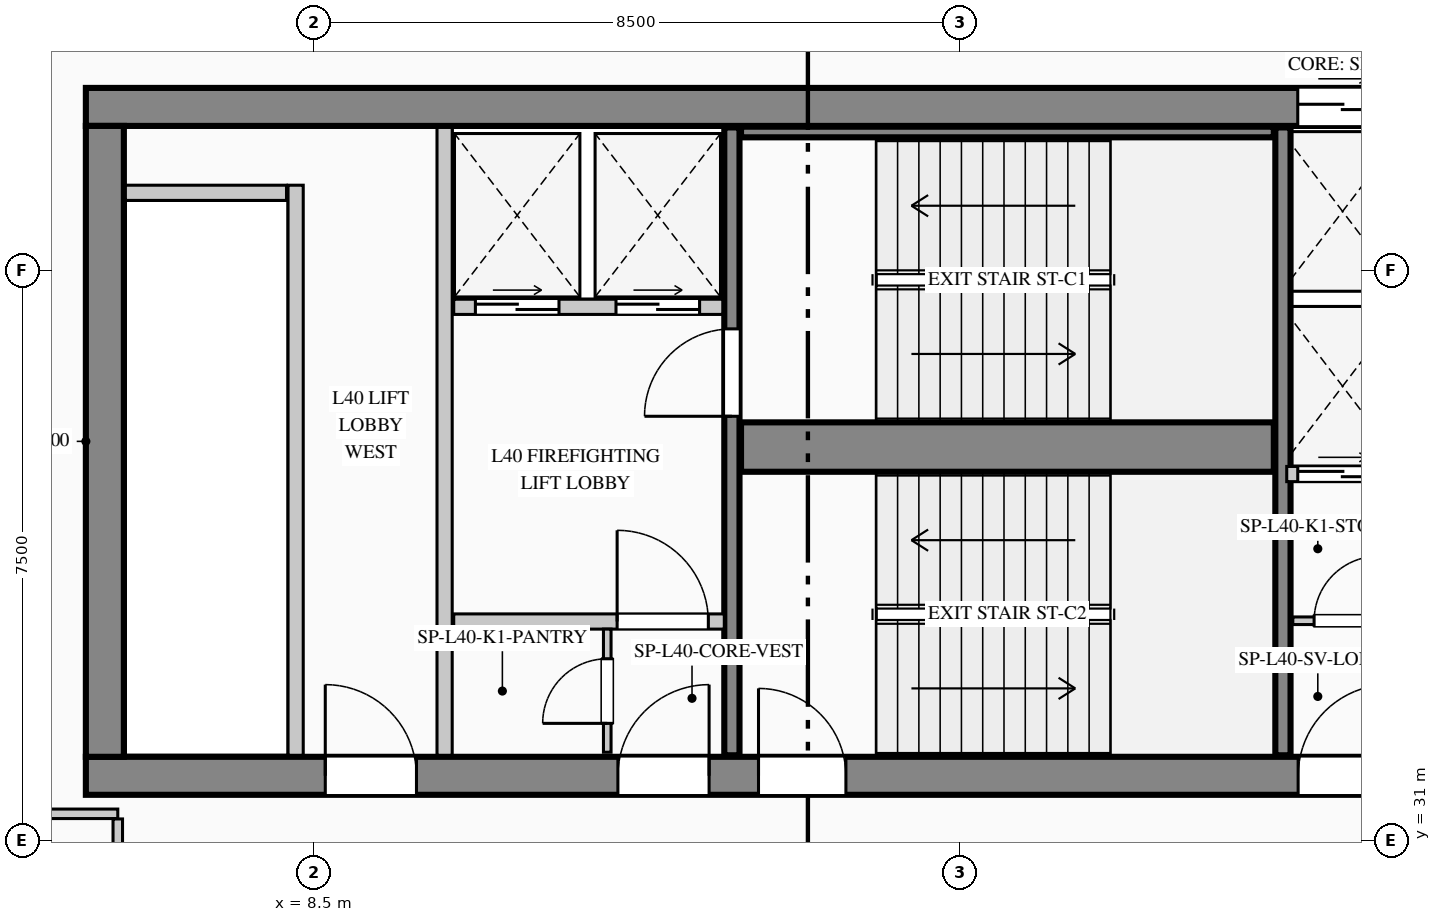
"""IFC4 building model, lengths in metres.
Left out: names, types, materials, properties, quantities, classifications, styles, units other than length and angle.
Written with IfcOpenShell. Run it as: python <this file> out.ifc"""

import sys

from ifc_helpers import new_model, si_unit, direction, frame, frame_2d, origin, place, context, subcontext, project, spatial, rectangle, extrude, element, fill, save


model = new_model("IFC4")
c1 = context("Model", 3, precision=1e-05, world=origin(), true_north=direction((0.0, 1.0)))
c2 = subcontext(c1, "Body", "Model", "MODEL_VIEW")
j1 = project(units=[si_unit("LENGTHUNIT", "METRE"), si_unit("PLANEANGLEUNIT", "RADIAN")], contexts=[c1])
p1 = place(None, origin())
s1 = spatial("IfcSite", under=j1, at=p1, CompositionType="ELEMENT")
p2 = place(p1, origin())
s2 = spatial("IfcBuilding", under=s1, at=p2, CompositionType="ELEMENT")
p3 = place(p2, frame((0.0, 0.0, 170.65)))
s3 = spatial("IfcBuildingStorey", under=s2, at=p3, CompositionType="ELEMENT", Elevation=170.65)
p4 = place(p3, frame((5.5, 40.65, 0.0), z_axis=(0.0, 0.0, 1.0), x_axis=(1.0, 0.0, 0.0)))
e1 = element("IfcWall", 1, at=p4, inside=s3, PredefinedType="SHEAR", context=c2, shape_type="SweptSolid", body=[
    extrude(rectangle(XDim=17.85, YDim=0.5, at=frame_2d((8.925, 0.0))), origin(), (0.0, 0.0, 1.0), 3.95),
])
p5 = place(p4, frame((15.945, 0.0, 0.0)))
e2 = element("IfcOpeningElement", 2, at=p5, cuts=e1, PredefinedType="OPENING", context=c2, shape_type="SweptSolid", body=[
    extrude(rectangle(XDim=1.18, YDim=2.25, at=frame_2d((0.59, 1.125))), frame((0.0, 0.26, 0.0), z_axis=(0.0, -1.0, 0.0), x_axis=(1.0, 0.0, 0.0)), (0.0, 0.0, 1.0), 0.52),
])
p6 = place(p3, frame((5.5, 31.85, 0.0), z_axis=(0.0, 0.0, 1.0), x_axis=(1.0, 0.0, 0.0)))
e3 = element("IfcWall", 3, at=p6, inside=s3, PredefinedType="SHEAR", context=c2, shape_type="SweptSolid", body=[
    extrude(rectangle(XDim=17.85, YDim=0.5, at=frame_2d((8.925, 0.0))), origin(), (0.0, 0.0, 1.0), 3.95),
])
p7 = place(p6, frame((3.15, 0.0, 0.0)))
e4 = element("IfcOpeningElement", 4, at=p7, cuts=e3, PredefinedType="OPENING", context=c2, shape_type="SweptSolid", body=[
    extrude(rectangle(XDim=1.2, YDim=2.2, at=frame_2d((0.6, 1.1))), frame((0.0, 0.26, 0.0), z_axis=(0.0, -1.0, 0.0), x_axis=(1.0, 0.0, 0.0)), (0.0, 0.0, 1.0), 0.52),
])
p8 = place(p6, frame((7.0, 0.0, 0.0)))
e5 = element("IfcOpeningElement", 5, at=p8, cuts=e3, PredefinedType="OPENING", context=c2, shape_type="SweptSolid", body=[
    extrude(rectangle(XDim=1.2, YDim=2.2, at=frame_2d((0.6, 1.1))), frame((0.0, 0.26, 0.0), z_axis=(0.0, -1.0, 0.0), x_axis=(1.0, 0.0, 0.0)), (0.0, 0.0, 1.0), 0.52),
])
p9 = place(p6, frame((8.85, 0.0, 0.0)))
e6 = element("IfcOpeningElement", 6, at=p9, cuts=e3, PredefinedType="OPENING", context=c2, shape_type="SweptSolid", body=[
    extrude(rectangle(XDim=1.15, YDim=2.2, at=frame_2d((0.575, 1.1))), frame((0.0, 0.26, 0.0), z_axis=(0.0, -1.0, 0.0), x_axis=(1.0, 0.0, 0.0)), (0.0, 0.0, 1.0), 0.52),
])
p10 = place(p6, frame((15.95, 0.0, 0.0)))
e7 = element("IfcOpeningElement", 7, at=p10, cuts=e3, PredefinedType="OPENING", context=c2, shape_type="SweptSolid", body=[
    extrude(rectangle(XDim=1.2, YDim=2.2, at=frame_2d((0.6, 1.1))), frame((0.0, 0.26, 0.0), z_axis=(0.0, -1.0, 0.0), x_axis=(1.0, 0.0, 0.0)), (0.0, 0.0, 1.0), 0.52),
])
p11 = place(p3, frame((5.75, 32.1, 0.0), z_axis=(0.0, 0.0, 1.0), x_axis=(0.0, 1.0, 0.0)))
e8 = element("IfcWall", 8, at=p11, inside=s3, PredefinedType="SHEAR", context=c2, shape_type="SweptSolid", body=[
    extrude(rectangle(XDim=8.3, YDim=0.5, at=frame_2d((4.15, 0.0))), origin(), (0.0, 0.0, 1.0), 3.95),
])
p12 = place(p3, frame((14.0, 32.12, 0.0), z_axis=(0.0, 0.0, 1.0), x_axis=(0.0, 1.0, 0.0)))
e9 = element("IfcWall", 9, at=p12, inside=s3, PredefinedType="SHEAR", context=c2, shape_type="SweptSolid", body=[
    extrude(rectangle(XDim=8.26, YDim=0.2, at=frame_2d((4.13, 0.0))), origin(), (0.0, 0.0, 1.0), 3.95),
])
p13 = place(p12, frame((4.46, 0.0, 0.0)))
e10 = element("IfcOpeningElement", 10, at=p13, cuts=e9, PredefinedType="OPENING", context=c2, shape_type="SweptSolid", body=[
    extrude(rectangle(XDim=1.15, YDim=2.2, at=frame_2d((0.575, 1.1))), frame((0.0, 0.11, 0.0), z_axis=(0.0, -1.0, 0.0), x_axis=(1.0, 0.0, 0.0)), (0.0, 0.0, 1.0), 0.22),
])
p14 = place(p3, frame((14.12, 36.175, 0.0), z_axis=(0.0, 0.0, 1.0), x_axis=(1.0, 0.0, 0.0)))
e11 = element("IfcWall", 11, at=p14, inside=s3, PredefinedType="SHEAR", context=c2, shape_type="SweptSolid", body=[
    extrude(rectangle(XDim=7.01, YDim=0.65, at=frame_2d((3.505, 0.0))), origin(), (0.0, 0.0, 1.0), 3.95),
])
p15 = place(p3, frame((21.25, 32.12, 0.0), z_axis=(0.0, 0.0, 1.0), x_axis=(0.0, 1.0, 0.0)))
e12 = element("IfcWall", 12, at=p15, inside=s3, PredefinedType="SHEAR", context=c2, shape_type="SweptSolid", body=[
    extrude(rectangle(XDim=8.26, YDim=0.2, at=frame_2d((4.13, 0.0))), origin(), (0.0, 0.0, 1.0), 3.95),
])
p16 = place(p3, frame((14.12, 40.32, 0.0), z_axis=(0.0, 0.0, 1.0), x_axis=(1.0, 0.0, 0.0)))
e13 = element("IfcWall", 13, at=p16, inside=s3, PredefinedType="SHEAR", context=c2, shape_type="SweptSolid", body=[
    extrude(rectangle(XDim=7.01, YDim=0.14, at=frame_2d((3.505, 0.0))), origin(), (0.0, 0.0, 1.0), 3.95),
])
p17 = place(p3, frame((7.993, 4.73, 0.0), z_axis=(0.0, 0.0, 1.0), x_axis=(-0.136989009016, 0.990572567462, 0.0)))
e14 = element("IfcWall", 14, at=p17, inside=s3, PredefinedType="STANDARD", context=c2, shape_type="SweptSolid", body=[
    extrude(rectangle(XDim=36.888, YDim=0.26, at=frame_2d((18.444, 0.0))), origin(), (0.0, 0.0, 1.0), 3.69),
])
p18 = place(p17, frame((20.949, 0.0, 0.9)))
e15 = element("IfcOpeningElement", 15, at=p18, cuts=e14, PredefinedType="OPENING", context=c2, shape_type="SweptSolid", body=[
    extrude(rectangle(XDim=2.1, YDim=2.0, at=frame_2d((1.05, 1.0))), frame((0.0, 0.14, 0.0), z_axis=(0.0, -1.0, 0.0), x_axis=(1.0, 0.0, 0.0)), (0.0, 0.0, 1.0), 0.28),
])
p19 = place(p3, frame((8.26, 32.12, 0.0), z_axis=(0.0, 0.0, 1.0), x_axis=(0.0, 1.0, 0.0)))
e16 = element("IfcWall", 16, at=p19, inside=s3, PredefinedType="PARTITIONING", context=c2, shape_type="SweptSolid", body=[
    extrude(rectangle(XDim=7.5, YDim=0.2, at=frame_2d((3.75, 0.0))), origin(), (0.0, 0.0, 1.0), 3.69),
])
p20 = place(p3, frame((6.02, 39.52, 0.0), z_axis=(0.0, 0.0, 1.0), x_axis=(1.0, 0.0, 0.0)))
e17 = element("IfcWall", 17, at=p20, inside=s3, PredefinedType="PARTITIONING", context=c2, shape_type="SweptSolid", body=[
    extrude(rectangle(XDim=2.12, YDim=0.2, at=frame_2d((1.06, 0.0))), origin(), (0.0, 0.0, 1.0), 3.69),
])
p21 = place(p3, frame((10.22, 32.12, 0.0), z_axis=(0.0, 0.0, 1.0), x_axis=(0.0, 1.0, 0.0)))
e18 = element("IfcWall", 18, at=p21, inside=s3, PredefinedType="PARTITIONING", context=c2, shape_type="SweptSolid", body=[
    extrude(rectangle(XDim=8.26, YDim=0.2, at=frame_2d((4.13, 0.0))), origin(), (0.0, 0.0, 1.0), 3.69),
])
p22 = place(p3, frame((10.34, 38.02, 0.0), z_axis=(0.0, 0.0, 1.0), x_axis=(1.0, 0.0, 0.0)))
e19 = element("IfcWall", 19, at=p22, inside=s3, PredefinedType="PARTITIONING", context=c2, shape_type="SweptSolid", body=[
    extrude(rectangle(XDim=3.54, YDim=0.2, at=frame_2d((1.77, 0.0))), origin(), (0.0, 0.0, 1.0), 3.69),
])
p23 = place(p22, frame((0.285, 0.0, 0.0)))
e20 = element("IfcOpeningElement", 20, at=p23, cuts=e19, PredefinedType="OPENING", context=c2, shape_type="SweptSolid", body=[
    extrude(rectangle(XDim=1.1, YDim=2.2, at=frame_2d((0.55, 1.1))), frame((0.0, 0.11, 0.0), z_axis=(0.0, -1.0, 0.0), x_axis=(1.0, 0.0, 0.0)), (0.0, 0.0, 1.0), 0.22),
])
p24 = place(p22, frame((2.135, 0.0, 0.0)))
e21 = element("IfcOpeningElement", 21, at=p24, cuts=e19, PredefinedType="OPENING", context=c2, shape_type="SweptSolid", body=[
    extrude(rectangle(XDim=1.1, YDim=2.2, at=frame_2d((0.55, 1.1))), frame((0.0, 0.11, 0.0), z_axis=(0.0, -1.0, 0.0), x_axis=(1.0, 0.0, 0.0)), (0.0, 0.0, 1.0), 0.22),
])
p25 = place(p3, frame((10.34, 33.88, 0.0), z_axis=(0.0, 0.0, 1.0), x_axis=(1.0, 0.0, 0.0)))
e22 = element("IfcWall", 22, at=p25, inside=s3, PredefinedType="PARTITIONING", context=c2, shape_type="SweptSolid", body=[
    extrude(rectangle(XDim=3.56, YDim=0.2, at=frame_2d((1.78, 0.0))), origin(), (0.0, 0.0, 1.0), 3.69),
])
p26 = place(p25, frame((2.15, 0.0, 0.0)))
e23 = element("IfcOpeningElement", 23, at=p26, cuts=e22, PredefinedType="OPENING", context=c2, shape_type="SweptSolid", body=[
    extrude(rectangle(XDim=1.2, YDim=2.2, at=frame_2d((0.6, 1.1))), frame((0.0, 0.11, 0.0), z_axis=(0.0, -1.0, 0.0), x_axis=(1.0, 0.0, 0.0)), (0.0, 0.0, 1.0), 0.22),
])
p27 = place(p3, frame((12.36, 32.16, 0.0), z_axis=(0.0, 0.0, 1.0), x_axis=(0.0, 1.0, 0.0)))
e24 = element("IfcWall", 24, at=p27, inside=s3, PredefinedType="PARTITIONING", context=c2, shape_type="SweptSolid", body=[
    extrude(rectangle(XDim=1.62, YDim=0.1, at=frame_2d((0.81, 0.0))), origin(), (0.0, 0.0, 1.0), 3.69),
])
p28 = place(p27, frame((0.38, 0.0, 0.0)))
e25 = element("IfcOpeningElement", 25, at=p28, cuts=e24, PredefinedType="OPENING", context=c2, shape_type="SweptSolid", body=[
    extrude(rectangle(XDim=0.85, YDim=2.1, at=frame_2d((0.425, 1.05))), frame((0.0, 0.06, 0.0), z_axis=(0.0, -1.0, 0.0), x_axis=(1.0, 0.0, 0.0)), (0.0, 0.0, 1.0), 0.12),
])
p29 = place(p3, frame((21.38, 33.89, 0.0), z_axis=(0.0, 0.0, 1.0), x_axis=(1.0, 0.0, 0.0)))
e26 = element("IfcWall", 26, at=p29, inside=s3, PredefinedType="PARTITIONING", context=c2, shape_type="SweptSolid", body=[
    extrude(rectangle(XDim=1.42, YDim=0.1, at=frame_2d((0.71, 0.0))), origin(), (0.0, 0.0, 1.0), 3.69),
])
p30 = place(p29, frame((0.28, 0.0, 0.0)))
e27 = element("IfcOpeningElement", 27, at=p30, cuts=e26, PredefinedType="OPENING", context=c2, shape_type="SweptSolid", body=[
    extrude(rectangle(XDim=0.85, YDim=2.1, at=frame_2d((0.425, 1.05))), frame((0.0, 0.06, 0.0), z_axis=(0.0, -1.0, 0.0), x_axis=(1.0, 0.0, 0.0)), (0.0, 0.0, 1.0), 0.12),
])
p31 = place(p3, frame((21.3, 35.82, 0.0), z_axis=(0.0, 0.0, 1.0), x_axis=(1.0, 0.0, 0.0)))
e28 = element("IfcWall", 28, at=p31, inside=s3, PredefinedType="PARTITIONING", context=c2, shape_type="SweptSolid", body=[
    extrude(rectangle(XDim=1.5, YDim=0.2, at=frame_2d((0.75, 0.0))), origin(), (0.0, 0.0, 1.0), 3.69),
])
p32 = place(p31, frame((0.145, 0.0, 0.0)))
e29 = element("IfcOpeningElement", 29, at=p32, cuts=e28, PredefinedType="OPENING", context=c2, shape_type="SweptSolid", body=[
    extrude(rectangle(XDim=1.18, YDim=2.25, at=frame_2d((0.59, 1.125))), frame((0.0, 0.11, 0.0), z_axis=(0.0, -1.0, 0.0), x_axis=(1.0, 0.0, 0.0)), (0.0, 0.0, 1.0), 0.22),
])
p33 = place(p3, frame((4.448, 31.35, 0.0), z_axis=(0.0, 0.0, 1.0), x_axis=(1.0, 0.0, 0.0)))
e30 = element("IfcWall", 30, at=p33, inside=s3, PredefinedType="PARTITIONING", context=c2, shape_type="SweptSolid", body=[
    extrude(rectangle(XDim=1.472, YDim=0.125, at=frame_2d((0.736, 0.0))), origin(), (0.0, 0.0, 1.0), 3.69),
])
p34 = place(p3, frame((5.92, 31.282, 0.0), z_axis=(0.0, 0.0, 1.0), x_axis=(0.0, -1.0, 0.0)))
e31 = element("IfcWall", 31, at=p34, inside=s3, PredefinedType="PARTITIONING", context=c2, shape_type="SweptSolid", body=[
    extrude(rectangle(XDim=2.682, YDim=0.125, at=frame_2d((1.341, 0.0))), origin(), (0.0, 0.0, 1.0), 3.69),
])
p35 = place(p7, origin())
e32 = element("IfcDoor", 32, at=p35, inside=s3, OperationType="SINGLE_SWING_LEFT", PredefinedType="DOOR", context=c2, shape_type="SweptSolid", body=[
    extrude(rectangle(XDim=1.2, YDim=2.2, at=frame_2d((0.6, 1.1))), frame((0.0, 0.025, 0.0), z_axis=(0.0, -1.0, 0.0), x_axis=(1.0, 0.0, 0.0)), (0.0, 0.0, 1.0), 0.05),
])
fill(e4, e32)
p36 = place(p8, origin())
e33 = element("IfcDoor", 33, at=p36, inside=s3, OperationType="SINGLE_SWING_RIGHT", PredefinedType="DOOR", context=c2, shape_type="SweptSolid", body=[
    extrude(rectangle(XDim=1.2, YDim=2.2, at=frame_2d((0.6, 1.1))), frame((0.0, 0.025, 0.0), z_axis=(0.0, -1.0, 0.0), x_axis=(1.0, 0.0, 0.0)), (0.0, 0.0, 1.0), 0.05),
])
fill(e5, e33)
p37 = place(p9, origin())
e34 = element("IfcDoor", 34, at=p37, inside=s3, OperationType="SINGLE_SWING_LEFT", PredefinedType="DOOR", context=c2, shape_type="SweptSolid", body=[
    extrude(rectangle(XDim=1.15, YDim=2.2, at=frame_2d((0.575, 1.1))), frame((0.0, 0.025, 0.0), z_axis=(0.0, -1.0, 0.0), x_axis=(1.0, 0.0, 0.0)), (0.0, 0.0, 1.0), 0.05),
])
fill(e6, e34)
p38 = place(p10, origin())
e35 = element("IfcDoor", 35, at=p38, inside=s3, OperationType="SINGLE_SWING_RIGHT", PredefinedType="DOOR", context=c2, shape_type="SweptSolid", body=[
    extrude(rectangle(XDim=1.2, YDim=2.2, at=frame_2d((0.6, 1.1))), frame((0.0, 0.025, 0.0), z_axis=(0.0, -1.0, 0.0), x_axis=(1.0, 0.0, 0.0)), (0.0, 0.0, 1.0), 0.05),
])
fill(e7, e35)
p39 = place(p26, origin())
e36 = element("IfcDoor", 36, at=p39, inside=s3, OperationType="SINGLE_SWING_LEFT", PredefinedType="DOOR", context=c2, shape_type="SweptSolid", body=[
    extrude(rectangle(XDim=1.2, YDim=2.2, at=frame_2d((0.6, 1.1))), frame((0.0, 0.025, 0.0), z_axis=(0.0, -1.0, 0.0), x_axis=(1.0, 0.0, 0.0)), (0.0, 0.0, 1.0), 0.05),
])
fill(e23, e36)
p40 = place(p28, origin())
e37 = element("IfcDoor", 37, at=p40, inside=s3, OperationType="SINGLE_SWING_LEFT", PredefinedType="DOOR", context=c2, shape_type="SweptSolid", body=[
    extrude(rectangle(XDim=0.85, YDim=2.1, at=frame_2d((0.425, 1.05))), frame((0.0, 0.025, 0.0), z_axis=(0.0, -1.0, 0.0), x_axis=(1.0, 0.0, 0.0)), (0.0, 0.0, 1.0), 0.05),
])
fill(e25, e37)
p41 = place(p30, origin())
e38 = element("IfcDoor", 38, at=p41, inside=s3, OperationType="SINGLE_SWING_RIGHT", PredefinedType="DOOR", context=c2, shape_type="SweptSolid", body=[
    extrude(rectangle(XDim=0.85, YDim=2.1, at=frame_2d((0.425, 1.05))), frame((0.0, 0.025, 0.0), z_axis=(0.0, -1.0, 0.0), x_axis=(1.0, 0.0, 0.0)), (0.0, 0.0, 1.0), 0.05),
])
fill(e27, e38)
p42 = place(p13, origin())
e39 = element("IfcDoor", 39, at=p42, inside=s3, OperationType="SINGLE_SWING_LEFT", PredefinedType="DOOR", context=c2, shape_type="SweptSolid", body=[
    extrude(rectangle(XDim=1.15, YDim=2.2, at=frame_2d((0.575, 1.1))), frame((0.0, 0.025, 0.0), z_axis=(0.0, -1.0, 0.0), x_axis=(1.0, 0.0, 0.0)), (0.0, 0.0, 1.0), 0.05),
])
fill(e10, e39)
p43 = place(p23, origin())
e40 = element("IfcDoor", 40, at=p43, inside=s3, OperationType="DOUBLE_DOOR_SLIDING", PredefinedType="DOOR", context=c2, shape_type="SweptSolid", body=[
    extrude(rectangle(XDim=1.1, YDim=2.2, at=frame_2d((0.55, 1.1))), frame((0.0, 0.025, 0.0), z_axis=(0.0, -1.0, 0.0), x_axis=(1.0, 0.0, 0.0)), (0.0, 0.0, 1.0), 0.05),
])
fill(e20, e40)
p44 = place(p24, origin())
e41 = element("IfcDoor", 41, at=p44, inside=s3, OperationType="DOUBLE_DOOR_SLIDING", PredefinedType="DOOR", context=c2, shape_type="SweptSolid", body=[
    extrude(rectangle(XDim=1.1, YDim=2.2, at=frame_2d((0.55, 1.1))), frame((0.0, 0.025, 0.0), z_axis=(0.0, -1.0, 0.0), x_axis=(1.0, 0.0, 0.0)), (0.0, 0.0, 1.0), 0.05),
])
fill(e21, e41)
p45 = place(p5, origin())
e42 = element("IfcDoor", 42, at=p45, inside=s3, OperationType="DOUBLE_DOOR_SLIDING", PredefinedType="DOOR", context=c2, shape_type="SweptSolid", body=[
    extrude(rectangle(XDim=1.18, YDim=2.25, at=frame_2d((0.59, 1.125))), frame((0.0, 0.025, 0.0), z_axis=(0.0, -1.0, 0.0), x_axis=(1.0, 0.0, 0.0)), (0.0, 0.0, 1.0), 0.05),
])
fill(e2, e42)
p46 = place(p32, origin())
e43 = element("IfcDoor", 43, at=p46, inside=s3, OperationType="DOUBLE_DOOR_SLIDING", PredefinedType="DOOR", context=c2, shape_type="SweptSolid", body=[
    extrude(rectangle(XDim=1.18, YDim=2.25, at=frame_2d((0.59, 1.125))), frame((0.0, 0.025, 0.0), z_axis=(0.0, -1.0, 0.0), x_axis=(1.0, 0.0, 0.0)), (0.0, 0.0, 1.0), 0.05),
])
fill(e29, e43)
save(model, sys.argv[1])
